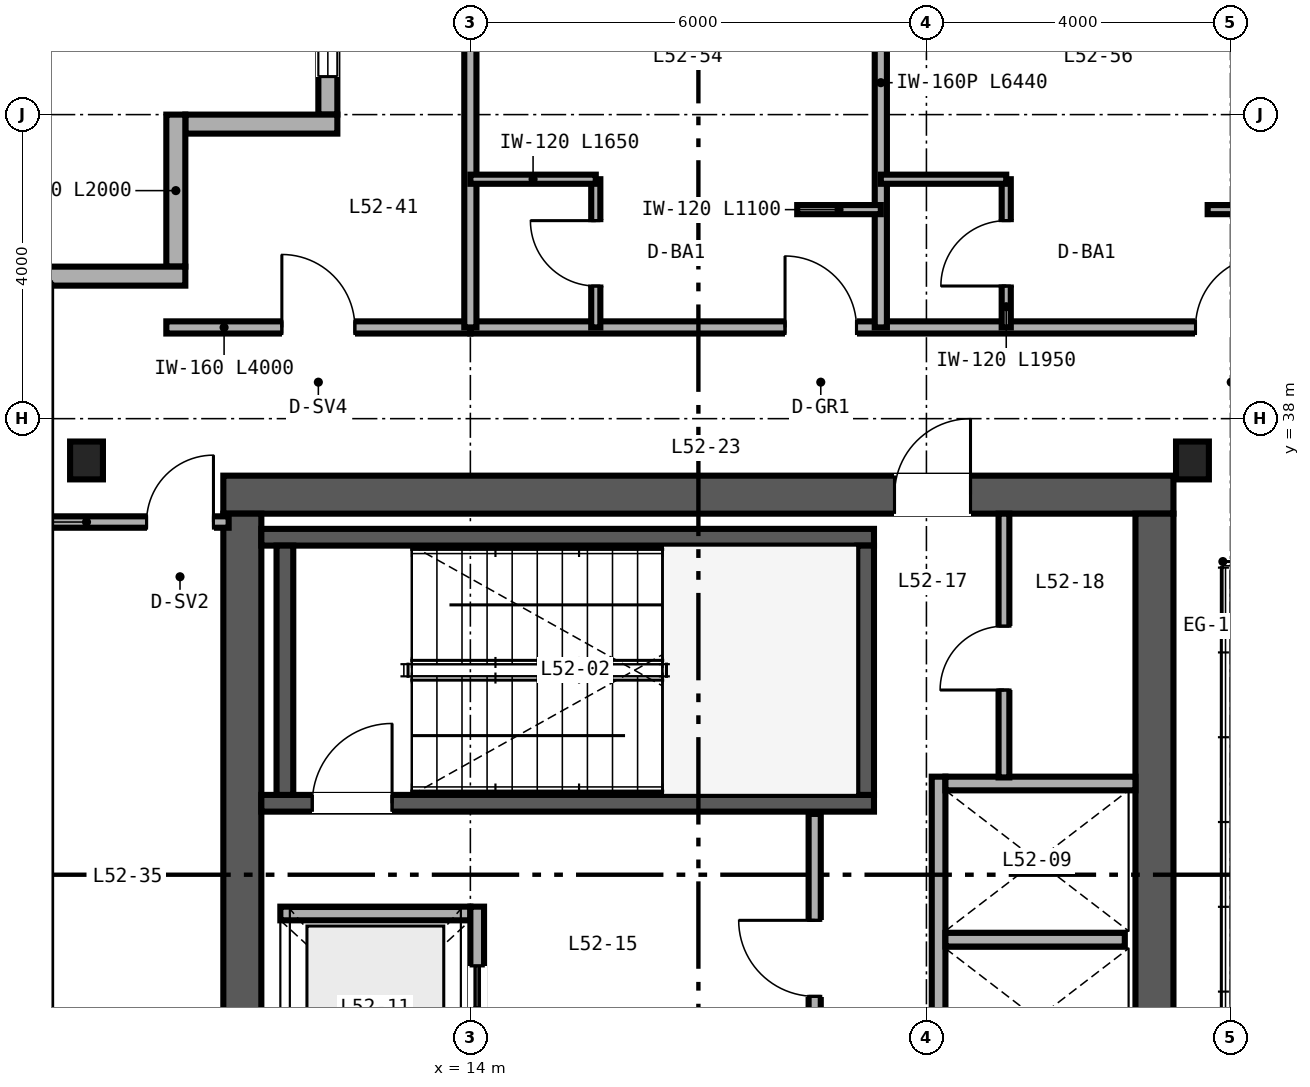
"""IFC4 building model, lengths in metres.
Left out: names, types, materials, properties, quantities, classifications, styles, units other than length and angle.
Written with IfcOpenShell. Run it as: python <this file> out.ifc"""

import sys

from ifc_helpers import new_model, si_unit, direction, frame, frame_2d, origin, origin_2d, place, context, subcontext, project, spatial, rectangle, i_section, extrude, source, transform, mapped, element, fill, save


model = new_model("IFC4")
c1 = context("Model", 3, precision=1e-05, world=origin(), true_north=direction((0.0, 1.0)))
c2 = subcontext(c1, "Body", "Model", "MODEL_VIEW")
j1 = project(units=[si_unit("LENGTHUNIT", "METRE"), si_unit("PLANEANGLEUNIT", "RADIAN")], contexts=[c1])
p1 = place(None, origin())
s1 = spatial("IfcSite", under=j1, at=p1, CompositionType="ELEMENT")
p2 = place(p1, origin())
s2 = spatial("IfcBuilding", under=s1, at=p2, CompositionType="ELEMENT")
p3 = place(p2, frame((0.0, 0.0, 206.4)))
s3 = spatial("IfcBuildingStorey", under=s2, at=p3, CompositionType="ELEMENT", Elevation=206.4)
p4 = place(p3, frame((10.75, 37.0, 0.0), z_axis=(0.0, 0.0, 1.0), x_axis=(1.0, 0.0, 0.0)))
e1 = element("IfcWall", 1, at=p4, inside=s3, PredefinedType="SHEAR", context=c2, shape_type="SweptSolid", body=[
    extrude(rectangle(XDim=12.5, YDim=0.5, at=frame_2d((6.25, 0.0))), origin(), (0.0, 0.0, 1.0), 3.37),
])
p5 = place(p4, frame((8.83, 0.0, 0.0)))
e2 = element("IfcOpeningElement", 2, at=p5, cuts=e1, PredefinedType="OPENING", context=c2, shape_type="SweptSolid", body=[
    extrude(rectangle(XDim=1.0, YDim=2.15, at=frame_2d((0.5, 1.075))), frame((0.0, 0.26, 0.0), z_axis=(0.0, -1.0, 0.0), x_axis=(1.0, 0.0, 0.0)), (0.0, 0.0, 1.0), 0.52),
])
for number, where, z_axis, x_axis in (
    (3, (11.0, 15.25, 0.0), (0.0, 0.0, 1.0), (0.0, 1.0, 0.0)),
    (4, (23.0, 15.25, 0.0), (0.0, 0.0, 1.0), (0.0, 1.0, 0.0)),
):
    element("IfcWall", number, at=place(p3, frame(where, z_axis=z_axis, x_axis=x_axis)), inside=s3, PredefinedType="SHEAR", context=c2, shape_type="SweptSolid", body=[
        extrude(rectangle(XDim=21.5, YDim=0.5, at=frame_2d((10.75, 0.0))), origin(), (0.0, 0.0, 1.0), 3.37),
    ])
p6 = place(p3, frame((11.25, 32.94, 0.0), z_axis=(0.0, 0.0, 1.0), x_axis=(1.0, 0.0, 0.0)))
e5 = element("IfcWall", 5, at=p6, inside=s3, PredefinedType="SHEAR", context=c2, shape_type="SweptSolid", body=[
    extrude(rectangle(XDim=8.06, YDim=0.22, at=frame_2d((4.03, 0.0))), origin(), (0.0, 0.0, 1.0), 3.4),
])
p7 = place(p6, frame((0.67, 0.0, 0.0)))
e6 = element("IfcOpeningElement", 6, at=p7, cuts=e5, PredefinedType="OPENING", context=c2, shape_type="SweptSolid", body=[
    extrude(rectangle(XDim=1.05, YDim=2.15, at=frame_2d((0.525, 1.075))), frame((0.0, 0.12, 0.0), z_axis=(0.0, -1.0, 0.0), x_axis=(1.0, 0.0, 0.0)), (0.0, 0.0, 1.0), 0.24),
])
p8 = place(p3, frame((11.25, 36.44, 0.0), z_axis=(0.0, 0.0, 1.0), x_axis=(1.0, 0.0, 0.0)))
e7 = element("IfcWall", 7, at=p8, inside=s3, PredefinedType="SHEAR", context=c2, shape_type="SweptSolid", body=[
    extrude(rectangle(XDim=8.06, YDim=0.22, at=frame_2d((4.03, 0.0))), origin(), (0.0, 0.0, 1.0), 3.4),
])
for number, where, z_axis, x_axis in (
    (8, (11.56, 33.05, 0.0), (0.0, 0.0, 1.0), (0.0, 1.0, 0.0)),
    (9, (19.2, 33.05, 0.0), (0.0, 0.0, 1.0), (0.0, 1.0, 0.0)),
):
    element("IfcWall", number, at=place(p3, frame(where, z_axis=z_axis, x_axis=x_axis)), inside=s3, PredefinedType="SHEAR", context=c2, shape_type="SweptSolid", body=[
        extrude(rectangle(XDim=3.28, YDim=0.22, at=frame_2d((1.64, 0.0))), origin(), (0.0, 0.0, 1.0), 3.4),
    ])
m1 = source(origin(), c2, "Body", "SweptSolid", [
    extrude(i_section(OverallWidth=0.432, OverallDepth=0.498, WebThickness=0.056, FlangeThickness=0.089, FilletRadius=0.025, at=origin_2d()), origin(), (0.0, 0.0, 1.0), 3.37),
])
for number, where, z_axis, x_axis in (
    (10, (8.95, 37.45, 0.0), (0.0, 0.0, 1.0), (1.0, 0.0, 0.0)),
    (11, (23.5, 37.45, 0.0), (0.0, 0.0, 1.0), (1.0, 0.0, 0.0)),
):
    element("IfcColumn", number, at=place(p3, frame(where, z_axis=z_axis, x_axis=x_axis)), inside=s3, PredefinedType="COLUMN", context=c2, shape_type="MappedRepresentation", body=[
        mapped(m1, transform((0.0, 0.0, 0.0), scale=1.0)),
    ])
p9 = place(p3, frame((12.125, 44.0, 0.0), z_axis=(0.0, 0.0, 1.0), x_axis=(0.0, -1.0, 0.0)))
e12 = element("IfcWall", 12, at=p9, inside=s3, PredefinedType="SOLIDWALL", context=c2, shape_type="SweptSolid", body=[
    extrude(rectangle(XDim=2.0, YDim=0.25, at=frame_2d((1.0, 0.0))), origin(), (0.0, 0.0, 1.0), 3.37),
])
p10 = place(p9, frame((0.5, 0.0, 0.85)))
e13 = element("IfcOpeningElement", 13, at=p10, cuts=e12, PredefinedType="OPENING", context=c2, shape_type="SweptSolid", body=[
    extrude(rectangle(XDim=1.0, YDim=1.9, at=frame_2d((0.5, 0.95))), frame((0.0, 0.135, 0.0), z_axis=(0.0, -1.0, 0.0), x_axis=(1.0, 0.0, 0.0)), (0.0, 0.0, 1.0), 0.27),
])
for number, where, z_axis, x_axis in (
    (14, (12.25, 41.875, 0.0), (0.0, 0.0, 1.0), (-1.0, 0.0, 0.0)),
    (15, (10.125, 42.0, 0.0), (0.0, 0.0, 1.0), (0.0, -1.0, 0.0)),
):
    element("IfcWall", number, at=place(p3, frame(where, z_axis=z_axis, x_axis=x_axis)), inside=s3, PredefinedType="SOLIDWALL", context=c2, shape_type="SweptSolid", body=[
        extrude(rectangle(XDim=2.0, YDim=0.25, at=frame_2d((1.0, 0.0))), origin(), (0.0, 0.0, 1.0), 3.37),
    ])
p11 = place(p3, frame((10.25, 39.875, 0.0), z_axis=(0.0, 0.0, 1.0), x_axis=(-1.0, 0.0, 0.0)))
e16 = element("IfcWall", 16, at=p11, inside=s3, PredefinedType="SOLIDWALL", context=c2, shape_type="SweptSolid", body=[
    extrude(rectangle(XDim=2.25, YDim=0.25, at=frame_2d((1.125, 0.0))), origin(), (0.0, 0.0, 1.0), 3.37),
])
p12 = place(p3, frame((20.16, 29.0, 0.0), z_axis=(0.0, 0.0, 1.0), x_axis=(0.0, 1.0, 0.0)))
e17 = element("IfcWall", 17, at=p12, inside=s3, PredefinedType="SOLIDWALL", context=c2, shape_type="SweptSolid", body=[
    extrude(rectangle(XDim=4.29, YDim=0.18, at=frame_2d((2.145, 0.0))), origin(), (0.0, 0.0, 1.0), 3.37),
])
p13 = place(p3, frame((20.25, 33.2, 0.0), z_axis=(0.0, 0.0, 1.0), x_axis=(1.0, 0.0, 0.0)))
e18 = element("IfcWall", 18, at=p13, inside=s3, PredefinedType="SOLIDWALL", context=c2, shape_type="SweptSolid", body=[
    extrude(rectangle(XDim=2.5, YDim=0.18, at=frame_2d((1.25, 0.0))), origin(), (0.0, 0.0, 1.0), 3.37),
])
p14 = place(p3, frame((20.25, 31.145, 0.0), z_axis=(0.0, 0.0, 1.0), x_axis=(1.0, 0.0, 0.0)))
e19 = element("IfcWall", 19, at=p14, inside=s3, PredefinedType="SOLIDWALL", context=c2, shape_type="SweptSolid", body=[
    extrude(rectangle(XDim=2.36, YDim=0.18, at=frame_2d((1.18, 0.0))), origin(), (0.0, 0.0, 1.0), 3.37),
])
p15 = place(p3, frame((11.5, 31.49, 0.0), z_axis=(0.0, 0.0, 1.0), x_axis=(1.0, 0.0, 0.0)))
e20 = element("IfcWall", 20, at=p15, inside=s3, PredefinedType="SOLIDWALL", context=c2, shape_type="SweptSolid", body=[
    extrude(rectangle(XDim=2.5, YDim=0.18, at=frame_2d((1.25, 0.0))), origin(), (0.0, 0.0, 1.0), 3.37),
])
p16 = place(p3, frame((14.09, 28.92, 0.0), z_axis=(0.0, 0.0, 1.0), x_axis=(0.0, 1.0, 0.0)))
e21 = element("IfcWall", 21, at=p16, inside=s3, PredefinedType="SOLIDWALL", context=c2, shape_type="SweptSolid", body=[
    extrude(rectangle(XDim=2.66, YDim=0.18, at=frame_2d((1.33, 0.0))), origin(), (0.0, 0.0, 1.0), 3.37),
])
p17 = place(p16, frame((0.78, 0.0, 0.0)))
e22 = element("IfcOpeningElement", 22, at=p17, cuts=e21, PredefinedType="OPENING", context=c2, shape_type="SweptSolid", body=[
    extrude(rectangle(XDim=1.1, YDim=2.2, at=frame_2d((0.55, 1.1))), frame((0.0, 0.1, 0.0), z_axis=(0.0, -1.0, 0.0), x_axis=(1.0, 0.0, 0.0)), (0.0, 0.0, 1.0), 0.2),
])
p18 = place(p3, frame((18.53, 28.9, 0.0), z_axis=(0.0, 0.0, 1.0), x_axis=(0.0, 1.0, 0.0)))
e23 = element("IfcWall", 23, at=p18, inside=s3, PredefinedType="PARTITIONING", context=c2, shape_type="SweptSolid", body=[
    extrude(rectangle(XDim=3.9, YDim=0.16, at=frame_2d((1.95, 0.0))), origin(), (0.0, 0.0, 1.0), 3.37),
])
p19 = place(p18, frame((1.5, 0.0, 0.0)))
e24 = element("IfcOpeningElement", 24, at=p19, cuts=e23, PredefinedType="OPENING", context=c2, shape_type="SweptSolid", body=[
    extrude(rectangle(XDim=1.0, YDim=2.15, at=frame_2d((0.5, 1.075))), frame((0.0, 0.09, 0.0), z_axis=(0.0, -1.0, 0.0), x_axis=(1.0, 0.0, 0.0)), (0.0, 0.0, 1.0), 0.18),
])
p20 = place(p3, frame((21.02, 33.28, 0.0), z_axis=(0.0, 0.0, 1.0), x_axis=(0.0, 1.0, 0.0)))
e25 = element("IfcWall", 25, at=p20, inside=s3, PredefinedType="PARTITIONING", context=c2, shape_type="SweptSolid", body=[
    extrude(rectangle(XDim=3.47, YDim=0.142, at=frame_2d((1.735, 0.0))), origin(), (0.0, 0.0, 1.0), 3.37),
])
p21 = place(p20, frame((1.15, 0.0, 0.0)))
e26 = element("IfcOpeningElement", 26, at=p21, cuts=e25, PredefinedType="OPENING", context=c2, shape_type="SweptSolid", body=[
    extrude(rectangle(XDim=0.84, YDim=2.1, at=frame_2d((0.42, 1.05))), frame((0.0, 0.081, 0.0), z_axis=(0.0, -1.0, 0.0), x_axis=(1.0, 0.0, 0.0)), (0.0, 0.0, 1.0), 0.162),
])
p22 = place(p3, frame((8.16, 36.64, 0.0), z_axis=(0.0, 0.0, 1.0), x_axis=(1.0, 0.0, 0.0)))
e27 = element("IfcWall", 27, at=p22, inside=s3, PredefinedType="PARTITIONING", context=c2, shape_type="SweptSolid", body=[
    extrude(rectangle(XDim=2.66, YDim=0.15, at=frame_2d((1.33, 0.0))), origin(), (0.0, 0.0, 1.0), 2.753),
])
p23 = place(p22, frame((1.58, 0.0, 0.0)))
e28 = element("IfcOpeningElement", 28, at=p23, cuts=e27, PredefinedType="OPENING", context=c2, shape_type="SweptSolid", body=[
    extrude(rectangle(XDim=0.88, YDim=2.15, at=frame_2d((0.44, 1.075))), frame((0.0, 0.085, 0.0), z_axis=(0.0, -1.0, 0.0), x_axis=(1.0, 0.0, 0.0)), (0.0, 0.0, 1.0), 0.17),
])
p24 = place(p3, frame((10.0, 39.2, 0.0), z_axis=(0.0, 0.0, 1.0), x_axis=(1.0, 0.0, 0.0)))
e29 = element("IfcWall", 29, at=p24, inside=s3, PredefinedType="PARTITIONING", context=c2, shape_type="SweptSolid", body=[
    extrude(rectangle(XDim=4.0, YDim=0.16, at=frame_2d((2.0, 0.0))), origin(), (0.0, 0.0, 1.0), 3.37),
])
p25 = place(p24, frame((1.52, 0.0, 0.0)))
e30 = element("IfcOpeningElement", 30, at=p25, cuts=e29, PredefinedType="OPENING", context=c2, shape_type="SweptSolid", body=[
    extrude(rectangle(XDim=0.96, YDim=2.15, at=frame_2d((0.48, 1.075))), frame((0.0, 0.09, 0.0), z_axis=(0.0, -1.0, 0.0), x_axis=(1.0, 0.0, 0.0)), (0.0, 0.0, 1.0), 0.18),
])
p26 = place(p3, frame((14.0, 39.2, 0.0), z_axis=(0.0, 0.0, 1.0), x_axis=(1.0, 0.0, 0.0)))
e31 = element("IfcWall", 31, at=p26, inside=s3, PredefinedType="PARTITIONING", context=c2, shape_type="SweptSolid", body=[
    extrude(rectangle(XDim=36.0, YDim=0.16, at=frame_2d((18.0, 0.0))), origin(), (0.0, 0.0, 1.0), 2.913),
])
p27 = place(p26, frame((4.14, 0.0, 0.0)))
e32 = element("IfcOpeningElement", 32, at=p27, cuts=e31, PredefinedType="OPENING", context=c2, shape_type="SweptSolid", body=[
    extrude(rectangle(XDim=0.94, YDim=2.15, at=frame_2d((0.47, 1.075))), frame((0.0, 0.09, 0.0), z_axis=(0.0, -1.0, 0.0), x_axis=(1.0, 0.0, 0.0)), (0.0, 0.0, 1.0), 0.18),
])
p28 = place(p26, frame((9.54, 0.0, 0.0)))
e33 = element("IfcOpeningElement", 33, at=p28, cuts=e31, PredefinedType="OPENING", context=c2, shape_type="SweptSolid", body=[
    extrude(rectangle(XDim=0.94, YDim=2.15, at=frame_2d((0.47, 1.075))), frame((0.0, 0.09, 0.0), z_axis=(0.0, -1.0, 0.0), x_axis=(1.0, 0.0, 0.0)), (0.0, 0.0, 1.0), 0.18),
])
p29 = place(p26, frame((13.32, 0.0, 0.0)))
e34 = element("IfcOpeningElement", 34, at=p29, cuts=e31, PredefinedType="OPENING", context=c2, shape_type="SweptSolid", body=[
    extrude(rectangle(XDim=0.96, YDim=2.15, at=frame_2d((0.48, 1.075))), frame((0.0, 0.09, 0.0), z_axis=(0.0, -1.0, 0.0), x_axis=(1.0, 0.0, 0.0)), (0.0, 0.0, 1.0), 0.18),
])
p30 = place(p26, frame((21.54, 0.0, 0.0)))
e35 = element("IfcOpeningElement", 35, at=p30, cuts=e31, PredefinedType="OPENING", context=c2, shape_type="SweptSolid", body=[
    extrude(rectangle(XDim=0.94, YDim=2.15, at=frame_2d((0.47, 1.075))), frame((0.0, 0.09, 0.0), z_axis=(0.0, -1.0, 0.0), x_axis=(1.0, 0.0, 0.0)), (0.0, 0.0, 1.0), 0.18),
])
p31 = place(p26, frame((28.14, 0.0, 0.0)))
e36 = element("IfcOpeningElement", 36, at=p31, cuts=e31, PredefinedType="OPENING", context=c2, shape_type="SweptSolid", body=[
    extrude(rectangle(XDim=0.94, YDim=2.15, at=frame_2d((0.47, 1.075))), frame((0.0, 0.09, 0.0), z_axis=(0.0, -1.0, 0.0), x_axis=(1.0, 0.0, 0.0)), (0.0, 0.0, 1.0), 0.18),
])
p32 = place(p26, frame((34.74, 0.0, 0.0)))
e37 = element("IfcOpeningElement", 37, at=p32, cuts=e31, PredefinedType="OPENING", context=c2, shape_type="SweptSolid", body=[
    extrude(rectangle(XDim=0.94, YDim=2.15, at=frame_2d((0.47, 1.075))), frame((0.0, 0.09, 0.0), z_axis=(0.0, -1.0, 0.0), x_axis=(1.0, 0.0, 0.0)), (0.0, 0.0, 1.0), 0.18),
])
for number, where, z_axis, x_axis in (
    (38, (14.0, 39.2, 0.0), (0.0, 0.0, 1.0), (0.0, 1.0, 0.0)),
    (39, (19.4, 39.2, 0.0), (0.0, 0.0, 1.0), (0.0, 1.0, 0.0)),
):
    element("IfcWall", number, at=place(p3, frame(where, z_axis=z_axis, x_axis=x_axis)), inside=s3, PredefinedType="PARTITIONING", context=c2, shape_type="SweptSolid", body=[
        extrude(rectangle(XDim=6.44, YDim=0.16, at=frame_2d((3.22, 0.0))), origin(), (0.0, 0.0, 1.0), 2.677),
    ])
p33 = place(p3, frame((15.65, 39.2, 0.0), z_axis=(0.0, 0.0, 1.0), x_axis=(0.0, 1.0, 0.0)))
e40 = element("IfcWall", 40, at=p33, inside=s3, PredefinedType="PARTITIONING", context=c2, shape_type="SweptSolid", body=[
    extrude(rectangle(XDim=1.95, YDim=0.12, at=frame_2d((0.975, 0.0))), origin(), (0.0, 0.0, 1.0), 3.37),
])
p34 = place(p33, frame((0.545, 0.0, 0.0)))
e41 = element("IfcOpeningElement", 41, at=p34, cuts=e40, PredefinedType="OPENING", context=c2, shape_type="SweptSolid", body=[
    extrude(rectangle(XDim=0.86, YDim=2.1, at=frame_2d((0.43, 1.05))), frame((0.0, 0.07, 0.0), z_axis=(0.0, -1.0, 0.0), x_axis=(1.0, 0.0, 0.0)), (0.0, 0.0, 1.0), 0.14),
])
p35 = place(p3, frame((14.0, 41.15, 0.0), z_axis=(0.0, 0.0, 1.0), x_axis=(1.0, 0.0, 0.0)))
e42 = element("IfcWall", 42, at=p35, inside=s3, PredefinedType="PARTITIONING", context=c2, shape_type="SweptSolid", body=[
    extrude(rectangle(XDim=1.65, YDim=0.12, at=frame_2d((0.825, 0.0))), origin(), (0.0, 0.0, 1.0), 3.37),
])
p36 = place(p3, frame((18.3, 40.75, 0.0), z_axis=(0.0, 0.0, 1.0), x_axis=(1.0, 0.0, 0.0)))
e43 = element("IfcWall", 43, at=p36, inside=s3, PredefinedType="PARTITIONING", context=c2, shape_type="SweptSolid", body=[
    extrude(rectangle(XDim=1.1, YDim=0.12, at=frame_2d((0.55, 0.0))), origin(), (0.0, 0.0, 1.0), 3.37),
])
p37 = place(p3, frame((21.05, 39.2, 0.0), z_axis=(0.0, 0.0, 1.0), x_axis=(0.0, 1.0, 0.0)))
e44 = element("IfcWall", 44, at=p37, inside=s3, PredefinedType="PARTITIONING", context=c2, shape_type="SweptSolid", body=[
    extrude(rectangle(XDim=1.95, YDim=0.12, at=frame_2d((0.975, 0.0))), origin(), (0.0, 0.0, 1.0), 3.37),
])
p38 = place(p37, frame((0.545, 0.0, 0.0)))
e45 = element("IfcOpeningElement", 45, at=p38, cuts=e44, PredefinedType="OPENING", context=c2, shape_type="SweptSolid", body=[
    extrude(rectangle(XDim=0.86, YDim=2.1, at=frame_2d((0.43, 1.05))), frame((0.0, 0.07, 0.0), z_axis=(0.0, -1.0, 0.0), x_axis=(1.0, 0.0, 0.0)), (0.0, 0.0, 1.0), 0.14),
])
p39 = place(p3, frame((19.4, 41.15, 0.0), z_axis=(0.0, 0.0, 1.0), x_axis=(1.0, 0.0, 0.0)))
e46 = element("IfcWall", 46, at=p39, inside=s3, PredefinedType="PARTITIONING", context=c2, shape_type="SweptSolid", body=[
    extrude(rectangle(XDim=1.65, YDim=0.12, at=frame_2d((0.825, 0.0))), origin(), (0.0, 0.0, 1.0), 3.37),
])
p40 = place(p3, frame((23.7, 40.75, 0.0), z_axis=(0.0, 0.0, 1.0), x_axis=(1.0, 0.0, 0.0)))
e47 = element("IfcWall", 47, at=p40, inside=s3, PredefinedType="PARTITIONING", context=c2, shape_type="SweptSolid", body=[
    extrude(rectangle(XDim=1.1, YDim=0.12, at=frame_2d((0.55, 0.0))), origin(), (0.0, 0.0, 1.0), 2.913),
])
m2 = source(origin(), c2, "Body", "SweptSolid", [
    extrude(rectangle(XDim=1.0, YDim=1.9, at=frame_2d((0.5, 0.95))), frame((0.0, 0.03, 0.0), z_axis=(0.0, -1.0, 0.0), x_axis=(1.0, 0.0, 0.0)), (0.0, 0.0, 1.0), 0.06),
])
p41 = place(p10, origin())
e48 = element("IfcWindow", 48, at=p41, inside=s3, PartitioningType="SINGLE_PANEL", PredefinedType="WINDOW", context=c2, shape_type="MappedRepresentation", body=[
    mapped(m2, transform((0.0, 0.0, 0.0), scale=1.0)),
])
fill(e13, e48)
m3 = source(origin(), c2, "Body", "SweptSolid", [
    extrude(rectangle(XDim=1.05, YDim=2.15, at=frame_2d((0.525, 1.075))), frame((0.0, 0.025, 0.0), z_axis=(0.0, -1.0, 0.0), x_axis=(1.0, 0.0, 0.0)), (0.0, 0.0, 1.0), 0.05),
])
p42 = place(p7, origin())
e49 = element("IfcDoor", 49, at=p42, inside=s3, OperationType="SINGLE_SWING_RIGHT", PredefinedType="DOOR", context=c2, shape_type="MappedRepresentation", body=[
    mapped(m3, transform((0.0, 0.0, 0.0), scale=1.0)),
])
fill(e6, e49)
m4 = source(origin(), c2, "Body", "SweptSolid", [
    extrude(rectangle(XDim=1.1, YDim=2.2, at=frame_2d((0.55, 1.1))), frame((0.0, 0.025, 0.0), z_axis=(0.0, -1.0, 0.0), x_axis=(1.0, 0.0, 0.0)), (0.0, 0.0, 1.0), 0.05),
])
p43 = place(p17, origin())
e50 = element("IfcDoor", 50, at=p43, inside=s3, OperationType="DOUBLE_DOOR_SLIDING", PredefinedType="DOOR", context=c2, shape_type="MappedRepresentation", body=[
    mapped(m4, transform((0.0, 0.0, 0.0), scale=1.0)),
])
fill(e22, e50)
m5 = source(origin(), c2, "Body", "SweptSolid", [
    extrude(rectangle(XDim=1.0, YDim=2.15, at=frame_2d((0.5, 1.075))), frame((0.0, 0.025, 0.0), z_axis=(0.0, -1.0, 0.0), x_axis=(1.0, 0.0, 0.0)), (0.0, 0.0, 1.0), 0.05),
])
p44 = place(p19, origin())
e51 = element("IfcDoor", 51, at=p44, inside=s3, OperationType="SINGLE_SWING_RIGHT", PredefinedType="DOOR", context=c2, shape_type="MappedRepresentation", body=[
    mapped(m5, transform((0.0, 0.0, 0.0), scale=1.0)),
])
fill(e24, e51)
m6 = source(origin(), c2, "Body", "SweptSolid", [
    extrude(rectangle(XDim=0.84, YDim=2.1, at=frame_2d((0.42, 1.05))), frame((0.0, 0.025, 0.0), z_axis=(0.0, -1.0, 0.0), x_axis=(1.0, 0.0, 0.0)), (0.0, 0.0, 1.0), 0.05),
])
p45 = place(p21, origin())
e52 = element("IfcDoor", 52, at=p45, inside=s3, OperationType="SINGLE_SWING_LEFT", PredefinedType="DOOR", context=c2, shape_type="MappedRepresentation", body=[
    mapped(m6, transform((0.0, 0.0, 0.0), scale=1.0)),
])
fill(e26, e52)
p46 = place(p5, origin())
e53 = element("IfcDoor", 53, at=p46, inside=s3, OperationType="SINGLE_SWING_RIGHT", PredefinedType="DOOR", context=c2, shape_type="MappedRepresentation", body=[
    mapped(m5, transform((0.0, 0.0, 0.0), scale=1.0)),
])
fill(e2, e53)
m7 = source(origin(), c2, "Body", "SweptSolid", [
    extrude(rectangle(XDim=0.88, YDim=2.15, at=frame_2d((0.44, 1.075))), frame((0.0, 0.025, 0.0), z_axis=(0.0, -1.0, 0.0), x_axis=(1.0, 0.0, 0.0)), (0.0, 0.0, 1.0), 0.05),
])
p47 = place(p23, origin())
e54 = element("IfcDoor", 54, at=p47, inside=s3, OperationType="SINGLE_SWING_RIGHT", PredefinedType="DOOR", context=c2, shape_type="MappedRepresentation", body=[
    mapped(m7, transform((0.0, 0.0, 0.0), scale=1.0)),
])
fill(e28, e54)
m8 = source(origin(), c2, "Body", "SweptSolid", [
    extrude(rectangle(XDim=0.96, YDim=2.15, at=frame_2d((0.48, 1.075))), frame((0.0, 0.025, 0.0), z_axis=(0.0, -1.0, 0.0), x_axis=(1.0, 0.0, 0.0)), (0.0, 0.0, 1.0), 0.05),
])
p48 = place(p25, origin())
e55 = element("IfcDoor", 55, at=p48, inside=s3, OperationType="SINGLE_SWING_LEFT", PredefinedType="DOOR", context=c2, shape_type="MappedRepresentation", body=[
    mapped(m8, transform((0.0, 0.0, 0.0), scale=1.0)),
])
fill(e30, e55)
m9 = source(origin(), c2, "Body", "SweptSolid", [
    extrude(rectangle(XDim=0.86, YDim=2.1, at=frame_2d((0.43, 1.05))), frame((0.0, 0.025, 0.0), z_axis=(0.0, -1.0, 0.0), x_axis=(1.0, 0.0, 0.0)), (0.0, 0.0, 1.0), 0.05),
])
p49 = place(p34, origin())
e56 = element("IfcDoor", 56, at=p49, inside=s3, OperationType="SINGLE_SWING_RIGHT", PredefinedType="DOOR", context=c2, shape_type="MappedRepresentation", body=[
    mapped(m9, transform((0.0, 0.0, 0.0), scale=1.0)),
])
fill(e41, e56)
p50 = place(p38, origin())
e57 = element("IfcDoor", 57, at=p50, inside=s3, OperationType="SINGLE_SWING_LEFT", PredefinedType="DOOR", context=c2, shape_type="MappedRepresentation", body=[
    mapped(m9, transform((0.0, 0.0, 0.0), scale=1.0)),
])
fill(e45, e57)
m10 = source(origin(), c2, "Body", "SweptSolid", [
    extrude(rectangle(XDim=0.94, YDim=2.15, at=frame_2d((0.47, 1.075))), frame((0.0, 0.025, 0.0), z_axis=(0.0, -1.0, 0.0), x_axis=(1.0, 0.0, 0.0)), (0.0, 0.0, 1.0), 0.05),
])
p51 = place(p27, origin())
e58 = element("IfcDoor", 58, at=p51, inside=s3, OperationType="SINGLE_SWING_LEFT", PredefinedType="DOOR", context=c2, shape_type="MappedRepresentation", body=[
    mapped(m10, transform((0.0, 0.0, 0.0), scale=1.0)),
])
fill(e32, e58)
p52 = place(p28, origin())
e59 = element("IfcDoor", 59, at=p52, inside=s3, OperationType="SINGLE_SWING_RIGHT", PredefinedType="DOOR", context=c2, shape_type="MappedRepresentation", body=[
    mapped(m10, transform((0.0, 0.0, 0.0), scale=1.0)),
])
fill(e33, e59)
save(model, sys.argv[1])
